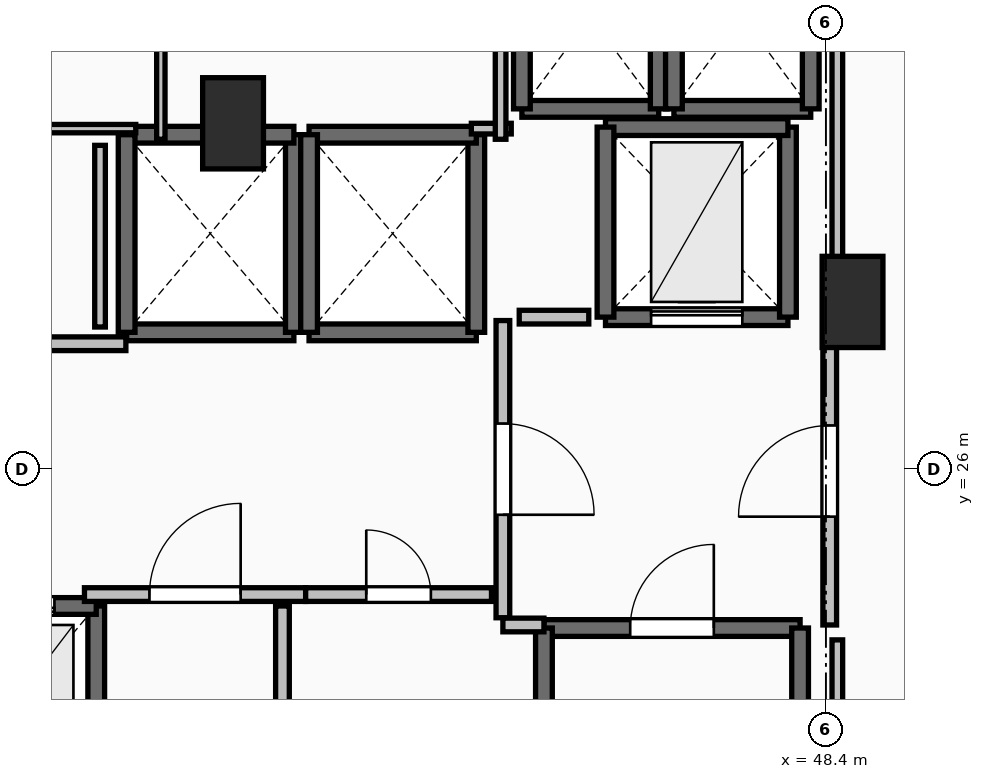
"""IFC4 building model, lengths in metres.
Left out: names, types, materials, properties, quantities, classifications, styles, units other than length and angle.
Written with IfcOpenShell. Run it as: python <this file> out.ifc"""

import sys

from ifc_helpers import new_model, si_unit, direction, frame, frame_2d, origin, origin_2d, place, context, subcontext, project, spatial, rectangle, extrude, element, fill, save


model = new_model("IFC4")
c1 = context("Model", 3, precision=1e-05, world=origin(), true_north=direction((0.0, 1.0)))
c2 = subcontext(c1, "Body", "Model", "MODEL_VIEW")
j1 = project(units=[si_unit("LENGTHUNIT", "METRE"), si_unit("PLANEANGLEUNIT", "RADIAN")], contexts=[c1])
p1 = place(None, origin())
s1 = spatial("IfcSite", under=j1, at=p1, CompositionType="ELEMENT")
p2 = place(p1, origin())
s2 = spatial("IfcBuilding", under=s1, at=p2, CompositionType="ELEMENT")
p3 = place(p2, frame((0.0, 0.0, 139.6)))
s3 = spatial("IfcBuildingStorey", under=s2, at=p3, CompositionType="ELEMENT", Elevation=139.6)
for number, where, z_axis, x_axis in (
    (1, (48.75, 28.2, 0.0), (0.0, 0.0, 1.0), (1.0, 0.0, 0.0)),
    (2, (40.6, 30.55, 0.0), (0.0, 0.0, 1.0), (1.0, 0.0, 0.0)),
):
    element("IfcColumn", number, at=place(p3, frame(where, z_axis=z_axis, x_axis=x_axis)), inside=s3, PredefinedType="PILASTER", context=c2, shape_type="SweptSolid", body=[
        extrude(rectangle(XDim=0.8, YDim=1.2, at=origin_2d()), origin(), (0.0, 0.0, 1.0), 3.5),
    ])
p4 = place(p3, frame((44.69, 23.91, 0.0), z_axis=(0.0, 0.0, 1.0), x_axis=(1.0, 0.0, 0.0)))
e3 = element("IfcWall", 3, at=p4, inside=s3, PredefinedType="SOLIDWALL", context=c2, shape_type="SweptSolid", body=[
    extrude(rectangle(XDim=3.37, YDim=0.22, at=frame_2d((1.685, 0.0))), origin(), (0.0, 0.0, 1.0), 3.24),
])
p5 = place(p4, frame((1.135, 0.0, 0.0)))
e4 = element("IfcOpeningElement", 4, at=p5, cuts=e3, PredefinedType="OPENING", context=c2, shape_type="SweptSolid", body=[
    extrude(rectangle(XDim=1.1, YDim=2.15, at=frame_2d((0.55, 1.075))), frame((0.0, 0.125, 0.0), z_axis=(0.0, -1.0, 0.0), x_axis=(1.0, 0.0, 0.0)), (0.0, 0.0, 1.0), 0.25),
])
for number, where, z_axis, x_axis in (
    (5, (48.06, 23.91, 0.0), (0.0, 0.0, 1.0), (0.0, -1.0, 0.0)),
    (6, (44.69, 16.49, 0.0), (0.0, 0.0, 1.0), (0.0, 1.0, 0.0)),
):
    element("IfcWall", number, at=place(p3, frame(where, z_axis=z_axis, x_axis=x_axis)), inside=s3, PredefinedType="SOLIDWALL", context=c2, shape_type="SweptSolid", body=[
        extrude(rectangle(XDim=7.42, YDim=0.22, at=frame_2d((3.71, 0.0))), origin(), (0.0, 0.0, 1.0), 3.24),
    ])
p6 = place(p3, frame((38.8, 21.6, 0.0), z_axis=(0.0, 0.0, 1.0), x_axis=(0.0, 1.0, 0.0)))
e7 = element("IfcWall", 7, at=p6, inside=s3, PredefinedType="SOLIDWALL", context=c2, shape_type="SweptSolid", body=[
    extrude(rectangle(XDim=2.6, YDim=0.22, at=frame_2d((1.3, 0.0))), origin(), (0.0, 0.0, 1.0), 3.24),
])
p7 = place(p3, frame((38.8, 24.2, 0.0), z_axis=(0.0, 0.0, 1.0), x_axis=(-1.0, 0.0, 0.0)))
e8 = element("IfcWall", 8, at=p7, inside=s3, PredefinedType="SOLIDWALL", context=c2, shape_type="SweptSolid", body=[
    extrude(rectangle(XDim=2.2, YDim=0.22, at=frame_2d((1.1, 0.0))), origin(), (0.0, 0.0, 1.0), 3.24),
])
p8 = place(p7, frame((0.55, 0.0, 0.0)))
e9 = element("IfcOpeningElement", 9, at=p8, cuts=e8, PredefinedType="OPENING", context=c2, shape_type="SweptSolid", body=[
    extrude(rectangle(XDim=1.1, YDim=2.2, at=frame_2d((0.55, 1.1))), frame((0.0, 0.125, 0.0), z_axis=(0.0, -1.0, 0.0), x_axis=(1.0, 0.0, 0.0)), (0.0, 0.0, 1.0), 0.25),
])
p9 = place(p3, frame((39.2, 27.8, 0.0), z_axis=(0.0, 0.0, 1.0), x_axis=(1.0, 0.0, 0.0)))
e10 = element("IfcWall", 10, at=p9, inside=s3, PredefinedType="SOLIDWALL", context=c2, shape_type="SweptSolid", body=[
    extrude(rectangle(XDim=2.2, YDim=0.22, at=frame_2d((1.1, 0.0))), origin(), (0.0, 0.0, 1.0), 3.24),
])
p10 = place(p3, frame((41.4, 27.8, 0.0), z_axis=(0.0, 0.0, 1.0), x_axis=(0.0, 1.0, 0.0)))
e11 = element("IfcWall", 11, at=p10, inside=s3, PredefinedType="SOLIDWALL", context=c2, shape_type="SweptSolid", body=[
    extrude(rectangle(XDim=2.6, YDim=0.22, at=frame_2d((1.3, 0.0))), origin(), (0.0, 0.0, 1.0), 3.24),
])
p11 = place(p3, frame((41.4, 30.4, 0.0), z_axis=(0.0, 0.0, 1.0), x_axis=(-1.0, 0.0, 0.0)))
e12 = element("IfcWall", 12, at=p11, inside=s3, PredefinedType="SOLIDWALL", context=c2, shape_type="SweptSolid", body=[
    extrude(rectangle(XDim=2.2, YDim=0.22, at=frame_2d((1.1, 0.0))), origin(), (0.0, 0.0, 1.0), 3.24),
])
p12 = place(p3, frame((39.2, 30.4, 0.0), z_axis=(0.0, 0.0, 1.0), x_axis=(0.0, -1.0, 0.0)))
e13 = element("IfcWall", 13, at=p12, inside=s3, PredefinedType="SOLIDWALL", context=c2, shape_type="SweptSolid", body=[
    extrude(rectangle(XDim=2.6, YDim=0.22, at=frame_2d((1.3, 0.0))), origin(), (0.0, 0.0, 1.0), 3.24),
])
p13 = place(p3, frame((41.6, 27.8, 0.0), z_axis=(0.0, 0.0, 1.0), x_axis=(1.0, 0.0, 0.0)))
e14 = element("IfcWall", 14, at=p13, inside=s3, PredefinedType="SOLIDWALL", context=c2, shape_type="SweptSolid", body=[
    extrude(rectangle(XDim=2.2, YDim=0.22, at=frame_2d((1.1, 0.0))), origin(), (0.0, 0.0, 1.0), 3.24),
])
p14 = place(p3, frame((43.8, 27.8, 0.0), z_axis=(0.0, 0.0, 1.0), x_axis=(0.0, 1.0, 0.0)))
e15 = element("IfcWall", 15, at=p14, inside=s3, PredefinedType="SOLIDWALL", context=c2, shape_type="SweptSolid", body=[
    extrude(rectangle(XDim=2.6, YDim=0.22, at=frame_2d((1.3, 0.0))), origin(), (0.0, 0.0, 1.0), 3.24),
])
p15 = place(p3, frame((43.8, 30.4, 0.0), z_axis=(0.0, 0.0, 1.0), x_axis=(-1.0, 0.0, 0.0)))
e16 = element("IfcWall", 16, at=p15, inside=s3, PredefinedType="SOLIDWALL", context=c2, shape_type="SweptSolid", body=[
    extrude(rectangle(XDim=2.2, YDim=0.22, at=frame_2d((1.1, 0.0))), origin(), (0.0, 0.0, 1.0), 3.24),
])
p16 = place(p3, frame((41.6, 30.4, 0.0), z_axis=(0.0, 0.0, 1.0), x_axis=(0.0, -1.0, 0.0)))
e17 = element("IfcWall", 17, at=p16, inside=s3, PredefinedType="SOLIDWALL", context=c2, shape_type="SweptSolid", body=[
    extrude(rectangle(XDim=2.6, YDim=0.22, at=frame_2d((1.3, 0.0))), origin(), (0.0, 0.0, 1.0), 3.24),
])
p17 = place(p3, frame((44.4, 30.74, 0.0), z_axis=(0.0, 0.0, 1.0), x_axis=(1.0, 0.0, 0.0)))
e18 = element("IfcWall", 18, at=p17, inside=s3, PredefinedType="SOLIDWALL", context=c2, shape_type="SweptSolid", body=[
    extrude(rectangle(XDim=1.8, YDim=0.22, at=frame_2d((0.9, 0.0))), origin(), (0.0, 0.0, 1.0), 3.24),
])
for number, where, z_axis, x_axis in (
    (19, (46.2, 30.74, 0.0), (0.0, 0.0, 1.0), (0.0, 1.0, 0.0)),
    (20, (44.4, 33.16, 0.0), (0.0, 0.0, 1.0), (0.0, -1.0, 0.0)),
):
    element("IfcWall", number, at=place(p3, frame(where, z_axis=z_axis, x_axis=x_axis)), inside=s3, PredefinedType="SOLIDWALL", context=c2, shape_type="SweptSolid", body=[
        extrude(rectangle(XDim=2.42, YDim=0.22, at=frame_2d((1.21, 0.0))), origin(), (0.0, 0.0, 1.0), 3.24),
    ])
p18 = place(p3, frame((46.4, 30.74, 0.0), z_axis=(0.0, 0.0, 1.0), x_axis=(1.0, 0.0, 0.0)))
e21 = element("IfcWall", 21, at=p18, inside=s3, PredefinedType="SOLIDWALL", context=c2, shape_type="SweptSolid", body=[
    extrude(rectangle(XDim=1.8, YDim=0.22, at=frame_2d((0.9, 0.0))), origin(), (0.0, 0.0, 1.0), 3.24),
])
for number, where, z_axis, x_axis in (
    (22, (48.2, 30.74, 0.0), (0.0, 0.0, 1.0), (0.0, 1.0, 0.0)),
    (23, (46.4, 33.16, 0.0), (0.0, 0.0, 1.0), (0.0, -1.0, 0.0)),
):
    element("IfcWall", number, at=place(p3, frame(where, z_axis=z_axis, x_axis=x_axis)), inside=s3, PredefinedType="SOLIDWALL", context=c2, shape_type="SweptSolid", body=[
        extrude(rectangle(XDim=2.42, YDim=0.22, at=frame_2d((1.21, 0.0))), origin(), (0.0, 0.0, 1.0), 3.24),
    ])
p19 = place(p3, frame((45.5, 28.0, 0.0), z_axis=(0.0, 0.0, 1.0), x_axis=(1.0, 0.0, 0.0)))
e24 = element("IfcWall", 24, at=p19, inside=s3, PredefinedType="SHEAR", context=c2, shape_type="SweptSolid", body=[
    extrude(rectangle(XDim=2.4, YDim=0.22, at=frame_2d((1.2, 0.0))), origin(), (0.0, 0.0, 1.0), 3.24),
])
p20 = place(p19, frame((0.6, 0.0, 0.0)))
e25 = element("IfcOpeningElement", 25, at=p20, cuts=e24, PredefinedType="OPENING", context=c2, shape_type="SweptSolid", body=[
    extrude(rectangle(XDim=1.2, YDim=2.2, at=frame_2d((0.6, 1.1))), frame((0.0, 0.125, 0.0), z_axis=(0.0, -1.0, 0.0), x_axis=(1.0, 0.0, 0.0)), (0.0, 0.0, 1.0), 0.25),
])
p21 = place(p3, frame((47.9, 28.0, 0.0), z_axis=(0.0, 0.0, 1.0), x_axis=(0.0, 1.0, 0.0)))
e26 = element("IfcWall", 26, at=p21, inside=s3, PredefinedType="SHEAR", context=c2, shape_type="SweptSolid", body=[
    extrude(rectangle(XDim=2.5, YDim=0.22, at=frame_2d((1.25, 0.0))), origin(), (0.0, 0.0, 1.0), 3.24),
])
p22 = place(p3, frame((47.9, 30.5, 0.0), z_axis=(0.0, 0.0, 1.0), x_axis=(-1.0, 0.0, 0.0)))
e27 = element("IfcWall", 27, at=p22, inside=s3, PredefinedType="SHEAR", context=c2, shape_type="SweptSolid", body=[
    extrude(rectangle(XDim=2.4, YDim=0.22, at=frame_2d((1.2, 0.0))), origin(), (0.0, 0.0, 1.0), 3.24),
])
p23 = place(p3, frame((45.5, 30.5, 0.0), z_axis=(0.0, 0.0, 1.0), x_axis=(0.0, -1.0, 0.0)))
e28 = element("IfcWall", 28, at=p23, inside=s3, PredefinedType="SHEAR", context=c2, shape_type="SweptSolid", body=[
    extrude(rectangle(XDim=2.5, YDim=0.22, at=frame_2d((1.25, 0.0))), origin(), (0.0, 0.0, 1.0), 3.24),
])
p24 = place(p3, frame((44.15, 27.955, 0.0), z_axis=(0.0, 0.0, 1.0), x_axis=(0.0, -1.0, 0.0)))
e29 = element("IfcWall", 29, at=p24, inside=s3, PredefinedType="PARTITIONING", context=c2, shape_type="SweptSolid", body=[
    extrude(rectangle(XDim=3.91, YDim=0.18, at=frame_2d((1.955, 0.0))), origin(), (0.0, 0.0, 1.0), 3.24),
])
p25 = place(p24, frame((1.355, 0.0, 0.0)))
e30 = element("IfcOpeningElement", 30, at=p25, cuts=e29, PredefinedType="OPENING", context=c2, shape_type="SweptSolid", body=[
    extrude(rectangle(XDim=1.2, YDim=2.15, at=frame_2d((0.6, 1.075))), frame((0.0, 0.105, 0.0), z_axis=(0.0, -1.0, 0.0), x_axis=(1.0, 0.0, 0.0)), (0.0, 0.0, 1.0), 0.21),
])
p26 = place(p3, frame((44.15, 23.95, 0.0), z_axis=(0.0, 0.0, 1.0), x_axis=(1.0, 0.0, 0.0)))
e31 = element("IfcWall", 31, at=p26, inside=s3, PredefinedType="PARTITIONING", context=c2, shape_type="SweptSolid", body=[
    extrude(rectangle(XDim=0.54, YDim=0.18, at=frame_2d((0.27, 0.0))), origin(), (0.0, 0.0, 1.0), 3.24),
])
p27 = place(p3, frame((48.45, 23.95, 0.0), z_axis=(0.0, 0.0, 1.0), x_axis=(0.0, 1.0, 0.0)))
e32 = element("IfcWall", 32, at=p27, inside=s3, PredefinedType="PARTITIONING", context=c2, shape_type="SweptSolid", body=[
    extrude(rectangle(XDim=4.05, YDim=0.18, at=frame_2d((2.025, 0.0))), origin(), (0.0, 0.0, 1.0), 3.24),
])
p28 = place(p27, frame((1.425, 0.0, 0.0)))
e33 = element("IfcOpeningElement", 33, at=p28, cuts=e32, PredefinedType="OPENING", context=c2, shape_type="SweptSolid", body=[
    extrude(rectangle(XDim=1.2, YDim=2.15, at=frame_2d((0.6, 1.075))), frame((0.0, 0.105, 0.0), z_axis=(0.0, -1.0, 0.0), x_axis=(1.0, 0.0, 0.0)), (0.0, 0.0, 1.0), 0.21),
])
p29 = place(p3, frame((38.645, 24.35, 0.0), z_axis=(0.0, 0.0, 1.0), x_axis=(1.0, 0.0, 0.0)))
e34 = element("IfcWall", 34, at=p29, inside=s3, PredefinedType="PARTITIONING", context=c2, shape_type="SweptSolid", body=[
    extrude(rectangle(XDim=2.91, YDim=0.18, at=frame_2d((1.455, 0.0))), origin(), (0.0, 0.0, 1.0), 3.24),
])
p30 = place(p29, frame((0.855, 0.0, 0.0)))
e35 = element("IfcOpeningElement", 35, at=p30, cuts=e34, PredefinedType="OPENING", context=c2, shape_type="SweptSolid", body=[
    extrude(rectangle(XDim=1.2, YDim=2.15, at=frame_2d((0.6, 1.075))), frame((0.0, 0.105, 0.0), z_axis=(0.0, -1.0, 0.0), x_axis=(1.0, 0.0, 0.0)), (0.0, 0.0, 1.0), 0.21),
])
p31 = place(p3, frame((41.555, 24.35, 0.0), z_axis=(0.0, 0.0, 1.0), x_axis=(1.0, 0.0, 0.0)))
e36 = element("IfcWall", 36, at=p31, inside=s3, PredefinedType="PARTITIONING", context=c2, shape_type="SweptSolid", body=[
    extrude(rectangle(XDim=2.445, YDim=0.18, at=frame_2d((1.223, 0.0))), origin(), (0.0, 0.0, 1.0), 3.24),
])
p32 = place(p31, frame((0.798, 0.0, 0.0)))
e37 = element("IfcOpeningElement", 37, at=p32, cuts=e36, PredefinedType="OPENING", context=c2, shape_type="SweptSolid", body=[
    extrude(rectangle(XDim=0.85, YDim=2.1, at=frame_2d((0.425, 1.05))), frame((0.0, 0.105, 0.0), z_axis=(0.0, -1.0, 0.0), x_axis=(1.0, 0.0, 0.0)), (0.0, 0.0, 1.0), 0.21),
])
p33 = place(p3, frame((39.19, 27.65, 0.0), z_axis=(0.0, 0.0, 1.0), x_axis=(-1.0, 0.0, 0.0)))
e38 = element("IfcWall", 38, at=p33, inside=s3, PredefinedType="PARTITIONING", context=c2, shape_type="SweptSolid", body=[
    extrude(rectangle(XDim=7.19, YDim=0.18, at=frame_2d((3.595, 0.0))), origin(), (0.0, 0.0, 1.0), 3.24),
])
p34 = place(p33, frame((3.095, 0.0, 0.0)))
e39 = element("IfcOpeningElement", 39, at=p34, cuts=e38, PredefinedType="OPENING", context=c2, shape_type="SweptSolid", body=[
    extrude(rectangle(XDim=1.0, YDim=2.15, at=frame_2d((0.5, 1.075))), frame((0.0, 0.105, 0.0), z_axis=(0.0, -1.0, 0.0), x_axis=(1.0, 0.0, 0.0)), (0.0, 0.0, 1.0), 0.21),
])
p35 = place(p3, frame((41.25, 20.305, 0.0), z_axis=(0.0, 0.0, 1.0), x_axis=(0.0, 1.0, 0.0)))
e40 = element("IfcWall", 40, at=p35, inside=s3, PredefinedType="PARTITIONING", context=c2, shape_type="SweptSolid", body=[
    extrude(rectangle(XDim=3.895, YDim=0.18, at=frame_2d((1.948, 0.0))), origin(), (0.0, 0.0, 1.0), 3.24),
])
p36 = place(p35, frame((1.522, 0.0, 0.0)))
e41 = element("IfcOpeningElement", 41, at=p36, cuts=e40, PredefinedType="OPENING", context=c2, shape_type="SweptSolid", body=[
    extrude(rectangle(XDim=0.85, YDim=2.1, at=frame_2d((0.425, 1.05))), frame((0.0, 0.105, 0.0), z_axis=(0.0, -1.0, 0.0), x_axis=(1.0, 0.0, 0.0)), (0.0, 0.0, 1.0), 0.21),
])
p37 = place(p3, frame((39.65, 30.34, 0.0), z_axis=(0.0, 0.0, 1.0), x_axis=(0.0, 1.0, 0.0)))
e42 = element("IfcWall", 42, at=p37, inside=s3, PredefinedType="PARTITIONING", context=c2, shape_type="SweptSolid", body=[
    extrude(rectangle(XDim=3.56, YDim=0.11, at=frame_2d((1.78, 0.0))), origin(), (0.0, 0.0, 1.0), 2.432),
])
p38 = place(p3, frame((36.16, 30.48, 0.0), z_axis=(0.0, 0.0, 1.0), x_axis=(1.0, 0.0, 0.0)))
e43 = element("IfcWall", 43, at=p38, inside=s3, PredefinedType="PARTITIONING", context=c2, shape_type="SweptSolid", body=[
    extrude(rectangle(XDim=3.16, YDim=0.11, at=frame_2d((1.58, 0.0))), origin(), (0.0, 0.0, 1.0), 2.432),
])
p39 = place(p3, frame((45.28, 28.0, 0.0), z_axis=(0.0, 0.0, 1.0), x_axis=(-1.0, 0.0, 0.0)))
e44 = element("IfcWall", 44, at=p39, inside=s3, PredefinedType="PARTITIONING", context=c2, shape_type="SweptSolid", body=[
    extrude(rectangle(XDim=0.915, YDim=0.18, at=frame_2d((0.458, 0.0))), origin(), (0.0, 0.0, 1.0), 3.24),
])
p40 = place(p3, frame((43.735, 30.48, 0.0), z_axis=(0.0, 0.0, 1.0), x_axis=(1.0, 0.0, 0.0)))
e45 = element("IfcWall", 45, at=p40, inside=s3, PredefinedType="PARTITIONING", context=c2, shape_type="SweptSolid", body=[
    extrude(rectangle(XDim=0.525, YDim=0.14, at=frame_2d((0.262, 0.0))), origin(), (0.0, 0.0, 1.0), 3.24),
])
p41 = place(p3, frame((44.12, 30.34, 0.0), z_axis=(0.0, 0.0, 1.0), x_axis=(0.0, 1.0, 0.0)))
e46 = element("IfcWall", 46, at=p41, inside=s3, PredefinedType="PARTITIONING", context=c2, shape_type="SweptSolid", body=[
    extrude(rectangle(XDim=2.66, YDim=0.14, at=frame_2d((1.33, 0.0))), origin(), (0.0, 0.0, 1.0), 3.24),
])
p42 = place(p3, frame((38.85, 27.87, 0.0), z_axis=(0.0, 0.0, 1.0), x_axis=(0.0, 1.0, 0.0)))
e47 = element("IfcWall", 47, at=p42, inside=s3, PredefinedType="PARTITIONING", context=c2, shape_type="SweptSolid", body=[
    extrude(rectangle(XDim=2.39, YDim=0.14, at=frame_2d((1.195, 0.0))), origin(), (0.0, 0.0, 1.0), 3.24),
])
p43 = place(p3, frame((48.55, 16.24, 0.0), z_axis=(0.0, 0.0, 1.0), x_axis=(0.0, 1.0, 0.0)))
e48 = element("IfcWall", 48, at=p43, inside=s3, PredefinedType="PARTITIONING", context=c2, shape_type="SweptSolid", body=[
    extrude(rectangle(XDim=7.514, YDim=0.14, at=frame_2d((3.757, 0.0))), origin(), (0.0, 0.0, 1.0), 2.432),
])
p44 = place(p3, frame((48.55, 28.196, 0.0), z_axis=(0.0, 0.0, 1.0), x_axis=(0.0, 1.0, 0.0)))
e49 = element("IfcWall", 49, at=p44, inside=s3, PredefinedType="PARTITIONING", context=c2, shape_type="SweptSolid", body=[
    extrude(rectangle(XDim=5.254, YDim=0.14, at=frame_2d((2.627, 0.0))), origin(), (0.0, 0.0, 1.0), 2.432),
])
p45 = place(p5, origin())
e50 = element("IfcDoor", 50, at=p45, inside=s3, OperationType="SINGLE_SWING_RIGHT", PredefinedType="DOOR", context=c2, shape_type="SweptSolid", body=[
    extrude(rectangle(XDim=1.1, YDim=2.15, at=frame_2d((0.55, 1.075))), frame((0.0, 0.025, 0.0), z_axis=(0.0, -1.0, 0.0), x_axis=(1.0, 0.0, 0.0)), (0.0, 0.0, 1.0), 0.05),
])
fill(e4, e50)
p46 = place(p8, origin())
e51 = element("IfcDoor", 51, at=p46, inside=s3, OperationType="SLIDING_TO_LEFT", PredefinedType="DOOR", context=c2, shape_type="SweptSolid", body=[
    extrude(rectangle(XDim=1.1, YDim=2.2, at=frame_2d((0.55, 1.1))), frame((0.0, 0.025, 0.0), z_axis=(0.0, -1.0, 0.0), x_axis=(1.0, 0.0, 0.0)), (0.0, 0.0, 1.0), 0.05),
])
fill(e9, e51)
p47 = place(p20, origin())
e52 = element("IfcDoor", 52, at=p47, inside=s3, OperationType="SLIDING_TO_LEFT", PredefinedType="DOOR", context=c2, shape_type="SweptSolid", body=[
    extrude(rectangle(XDim=1.2, YDim=2.2, at=frame_2d((0.6, 1.1))), frame((0.0, 0.025, 0.0), z_axis=(0.0, -1.0, 0.0), x_axis=(1.0, 0.0, 0.0)), (0.0, 0.0, 1.0), 0.05),
])
fill(e25, e52)
p48 = place(p25, origin())
e53 = element("IfcDoor", 53, at=p48, inside=s3, OperationType="SINGLE_SWING_RIGHT", PredefinedType="DOOR", context=c2, shape_type="SweptSolid", body=[
    extrude(rectangle(XDim=1.2, YDim=2.15, at=frame_2d((0.6, 1.075))), frame((0.0, 0.025, 0.0), z_axis=(0.0, -1.0, 0.0), x_axis=(1.0, 0.0, 0.0)), (0.0, 0.0, 1.0), 0.05),
])
fill(e30, e53)
p49 = place(p28, origin())
e54 = element("IfcDoor", 54, at=p49, inside=s3, OperationType="SINGLE_SWING_LEFT", PredefinedType="DOOR", context=c2, shape_type="SweptSolid", body=[
    extrude(rectangle(XDim=1.2, YDim=2.15, at=frame_2d((0.6, 1.075))), frame((0.0, 0.025, 0.0), z_axis=(0.0, -1.0, 0.0), x_axis=(1.0, 0.0, 0.0)), (0.0, 0.0, 1.0), 0.05),
])
fill(e33, e54)
p50 = place(p30, origin())
e55 = element("IfcDoor", 55, at=p50, inside=s3, OperationType="SINGLE_SWING_RIGHT", PredefinedType="DOOR", context=c2, shape_type="SweptSolid", body=[
    extrude(rectangle(XDim=1.2, YDim=2.15, at=frame_2d((0.6, 1.075))), frame((0.0, 0.025, 0.0), z_axis=(0.0, -1.0, 0.0), x_axis=(1.0, 0.0, 0.0)), (0.0, 0.0, 1.0), 0.05),
])
fill(e35, e55)
p51 = place(p32, origin())
e56 = element("IfcDoor", 56, at=p51, inside=s3, OperationType="SINGLE_SWING_LEFT", PredefinedType="DOOR", context=c2, shape_type="SweptSolid", body=[
    extrude(rectangle(XDim=0.85, YDim=2.1, at=frame_2d((0.425, 1.05))), frame((0.0, 0.025, 0.0), z_axis=(0.0, -1.0, 0.0), x_axis=(1.0, 0.0, 0.0)), (0.0, 0.0, 1.0), 0.05),
])
fill(e37, e56)
save(model, sys.argv[1])
